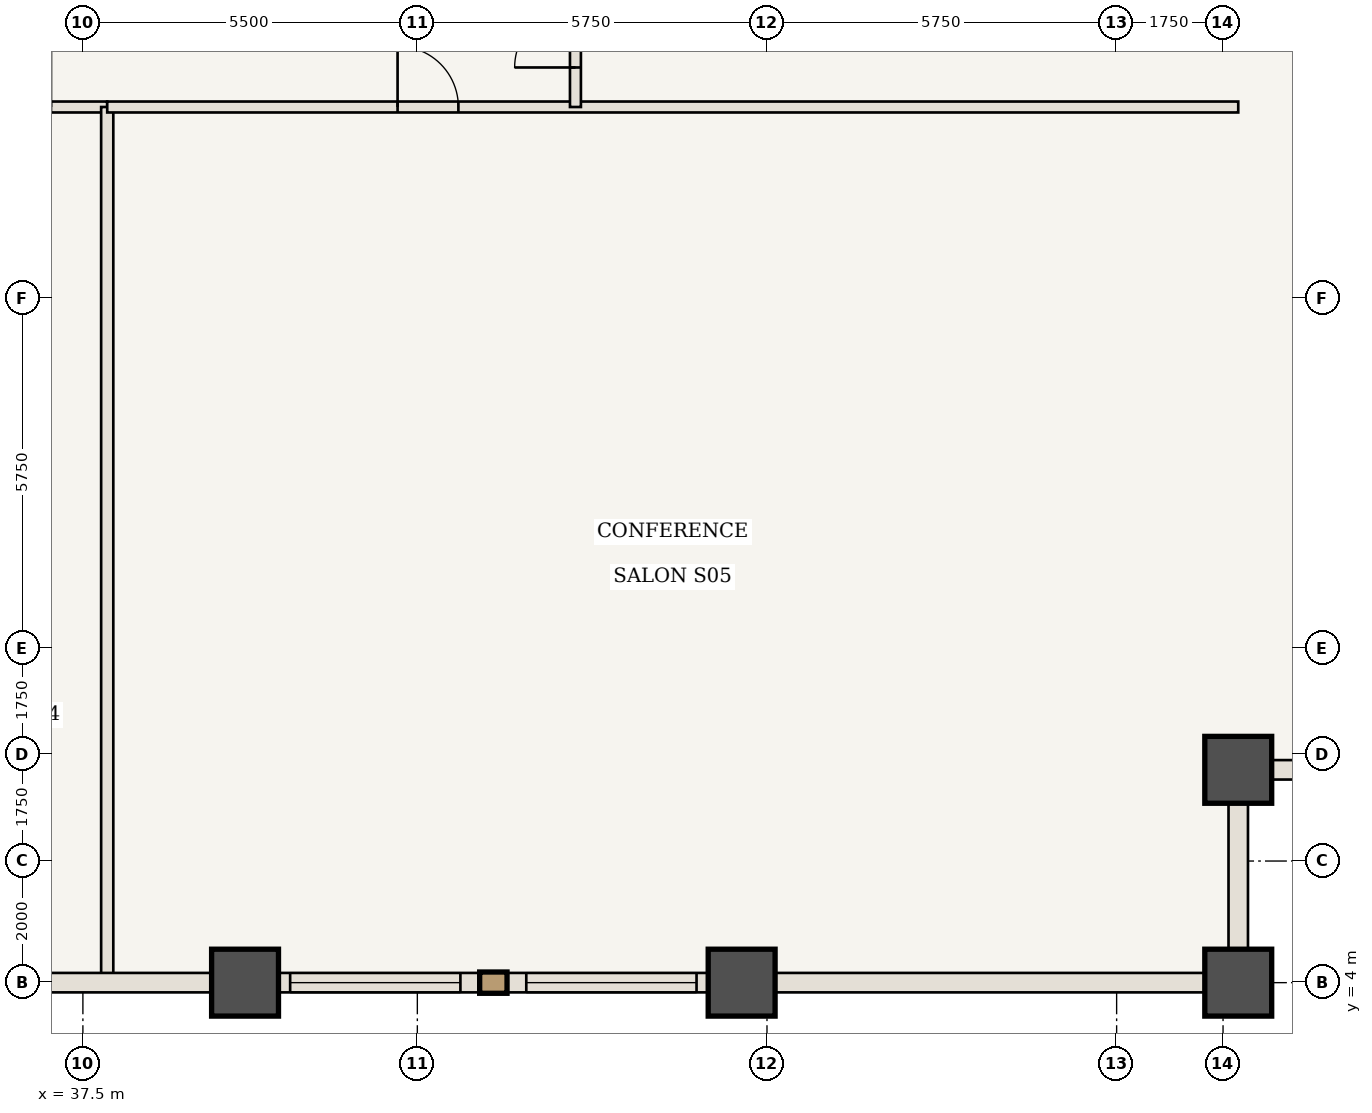
"""IFC4 building model, lengths in metres.
Left out: names, types, materials, properties, quantities, classifications, styles, units other than length and angle.
Written with IfcOpenShell. Run it as: python <this file> out.ifc"""

import sys

from ifc_helpers import new_model, si_unit, direction, frame, frame_2d, origin, origin_2d, place, context, subcontext, project, spatial, rectangle, extrude, element, fill, save


model = new_model("IFC4")
c1 = context("Model", 3, precision=1e-05, world=origin(), true_north=direction((0.0, 1.0)))
c2 = subcontext(c1, "Body", "Model", "MODEL_VIEW")
j1 = project(units=[si_unit("LENGTHUNIT", "METRE"), si_unit("PLANEANGLEUNIT", "RADIAN")], contexts=[c1])
p1 = place(None, origin())
s1 = spatial("IfcSite", under=j1, at=p1, CompositionType="ELEMENT")
p2 = place(p1, origin())
s2 = spatial("IfcBuilding", under=s1, at=p2, CompositionType="ELEMENT")
p3 = place(p2, frame((0.0, 0.0, 38.85)))
s3 = spatial("IfcBuildingStorey", under=s2, at=p3, CompositionType="ELEMENT", Elevation=38.85)
for number, where, z_axis, x_axis in (
    (1, (56.5, 4.0, 0.0), (0.0, 0.0, 1.0), (1.0, 0.0, 0.0)),
    (2, (56.5, 7.5, 0.0), (0.0, 0.0, 1.0), (1.0, 0.0, 0.0)),
    (3, (40.167, 4.0, 0.0), (0.0, 0.0, 1.0), (1.0, 0.0, 0.0)),
    (4, (48.333, 4.0, 0.0), (0.0, 0.0, 1.0), (1.0, 0.0, 0.0)),
):
    element("IfcColumn", number, at=place(p3, frame(where, z_axis=z_axis, x_axis=x_axis)), inside=s3, PredefinedType="COLUMN", context=c2, shape_type="SweptSolid", body=[
        extrude(rectangle(XDim=1.1, YDim=1.1, at=origin_2d()), origin(), (0.0, 0.0, 1.0), 3.5),
    ])
p4 = place(p3, frame((33.2, 18.4, 0.0), z_axis=(0.0, 0.0, 1.0), x_axis=(1.0, 0.0, 0.0)))
e5 = element("IfcWall", 5, at=p4, inside=s3, PredefinedType="STANDARD", context=c2, shape_type="SweptSolid", body=[
    extrude(rectangle(XDim=4.7, YDim=0.18, at=frame_2d((2.35, 0.0))), origin(), (0.0, 0.0, 1.0), 3.08),
])
p5 = place(p4, frame((2.775, 0.0, 0.0)))
e6 = element("IfcOpeningElement", 6, at=p5, cuts=e5, PredefinedType="OPENING", context=c2, shape_type="SweptSolid", body=[
    extrude(rectangle(XDim=1.0, YDim=2.15, at=frame_2d((0.5, 1.075))), frame((0.0, 0.1, 0.0), z_axis=(0.0, -1.0, 0.0), x_axis=(1.0, 0.0, 0.0)), (0.0, 0.0, 1.0), 0.2),
])
p6 = place(p3, frame((37.9, 4.06, 0.0), z_axis=(0.0, 0.0, 1.0), x_axis=(0.0, 1.0, 0.0)))
e7 = element("IfcWall", 7, at=p6, inside=s3, PredefinedType="STANDARD", context=c2, shape_type="SweptSolid", body=[
    extrude(rectangle(XDim=14.34, YDim=0.2, at=frame_2d((7.17, 0.0))), origin(), (0.0, 0.0, 1.0), 3.08),
])
p7 = place(p3, frame((37.9, 18.4, 0.0), z_axis=(0.0, 0.0, 1.0), x_axis=(1.0, 0.0, 0.0)))
e8 = element("IfcWall", 8, at=p7, inside=s3, PredefinedType="STANDARD", context=c2, shape_type="SweptSolid", body=[
    extrude(rectangle(XDim=18.6, YDim=0.18, at=frame_2d((9.3, 0.0))), origin(), (0.0, 0.0, 1.0), 3.08),
])
p8 = place(p7, frame((4.775, 0.0, 0.0)))
e9 = element("IfcOpeningElement", 9, at=p8, cuts=e8, PredefinedType="OPENING", context=c2, shape_type="SweptSolid", body=[
    extrude(rectangle(XDim=1.0, YDim=2.15, at=frame_2d((0.5, 1.075))), frame((0.0, 0.1, 0.0), z_axis=(0.0, -1.0, 0.0), x_axis=(1.0, 0.0, 0.0)), (0.0, 0.0, 1.0), 0.2),
])
p9 = place(p3, frame((45.6, 18.4, 0.0), z_axis=(0.0, 0.0, 1.0), x_axis=(0.0, 1.0, 0.0)))
e10 = element("IfcWall", 10, at=p9, inside=s3, PredefinedType="STANDARD", context=c2, shape_type="SweptSolid", body=[
    extrude(rectangle(XDim=5.2, YDim=0.18, at=frame_2d((2.6, 0.0))), origin(), (0.0, 0.0, 1.0), 3.08),
])
p10 = place(p9, frame((0.65, 0.0, 0.0)))
e11 = element("IfcOpeningElement", 11, at=p10, cuts=e10, PredefinedType="OPENING", context=c2, shape_type="SweptSolid", body=[
    extrude(rectangle(XDim=1.0, YDim=2.15, at=frame_2d((0.5, 1.075))), frame((0.0, 0.1, 0.0), z_axis=(0.0, -1.0, 0.0), x_axis=(1.0, 0.0, 0.0)), (0.0, 0.0, 1.0), 0.2),
])
p11 = place(p3, frame((40.167, 4.0, 0.0), z_axis=(0.0, 0.0, 1.0), x_axis=(-1.0, 0.0, 0.0)))
e12 = element("IfcWall", 12, at=p11, inside=s3, PredefinedType="USERDEFINED", context=c2, shape_type="SweptSolid", body=[
    extrude(rectangle(XDim=8.167, YDim=0.32, at=frame_2d((4.083, 0.0))), origin(), (0.0, 0.0, 1.0), 2.28),
])
p12 = place(p11, frame((3.417, 0.0, 0.85)))
e13 = element("IfcOpeningElement", 13, at=p12, cuts=e12, PredefinedType="OPENING", context=c2, shape_type="SweptSolid", body=[
    extrude(rectangle(XDim=2.4, YDim=1.23, at=frame_2d((1.2, 0.615))), frame((0.0, 0.17, 0.0), z_axis=(0.0, -1.0, 0.0), x_axis=(1.0, 0.0, 0.0)), (0.0, 0.0, 1.0), 0.34),
])
p13 = place(p3, frame((48.333, 4.0, 0.0), z_axis=(0.0, 0.0, 1.0), x_axis=(-1.0, 0.0, 0.0)))
e14 = element("IfcWall", 14, at=p13, inside=s3, PredefinedType="USERDEFINED", context=c2, shape_type="SweptSolid", body=[
    extrude(rectangle(XDim=8.167, YDim=0.32, at=frame_2d((4.083, 0.0))), origin(), (0.0, 0.0, 1.0), 2.28),
])
p14 = place(p13, frame((0.742, 0.0, 0.85)))
e15 = element("IfcOpeningElement", 15, at=p14, cuts=e14, PredefinedType="OPENING", context=c2, shape_type="SweptSolid", body=[
    extrude(rectangle(XDim=2.8, YDim=1.23, at=frame_2d((1.4, 0.615))), frame((0.0, 0.17, 0.0), z_axis=(0.0, -1.0, 0.0), x_axis=(1.0, 0.0, 0.0)), (0.0, 0.0, 1.0), 0.34),
])
p15 = place(p13, frame((4.625, 0.0, 0.85)))
e16 = element("IfcOpeningElement", 16, at=p15, cuts=e14, PredefinedType="OPENING", context=c2, shape_type="SweptSolid", body=[
    extrude(rectangle(XDim=2.8, YDim=1.23, at=frame_2d((1.4, 0.615))), frame((0.0, 0.17, 0.0), z_axis=(0.0, -1.0, 0.0), x_axis=(1.0, 0.0, 0.0)), (0.0, 0.0, 1.0), 0.34),
])
p16 = place(p3, frame((56.5, 4.0, 0.0), z_axis=(0.0, 0.0, 1.0), x_axis=(-1.0, 0.0, 0.0)))
e17 = element("IfcWall", 17, at=p16, inside=s3, PredefinedType="USERDEFINED", context=c2, shape_type="SweptSolid", body=[
    extrude(rectangle(XDim=8.167, YDim=0.32, at=frame_2d((4.083, 0.0))), origin(), (0.0, 0.0, 1.0), 2.28),
])
for number, where, z_axis, x_axis in (
    (18, (56.5, 7.5, 0.0), (0.0, 0.0, 1.0), (0.0, -1.0, 0.0)),
    (19, (60.0, 7.5, 0.0), (0.0, 0.0, 1.0), (-1.0, 0.0, 0.0)),
):
    element("IfcWall", number, at=place(p3, frame(where, z_axis=z_axis, x_axis=x_axis)), inside=s3, PredefinedType="USERDEFINED", context=c2, shape_type="SweptSolid", body=[
        extrude(rectangle(XDim=3.5, YDim=0.32, at=frame_2d((1.75, 0.0))), origin(), (0.0, 0.0, 1.0), 2.28),
    ])
p17 = place(p8, origin())
e20 = element("IfcDoor", 20, at=p17, inside=s3, OperationType="SINGLE_SWING_LEFT", PredefinedType="DOOR", context=c2, shape_type="SweptSolid", body=[
    extrude(rectangle(XDim=1.0, YDim=2.15, at=frame_2d((0.5, 1.075))), frame((0.0, 0.025, 0.0), z_axis=(0.0, -1.0, 0.0), x_axis=(1.0, 0.0, 0.0)), (0.0, 0.0, 1.0), 0.05),
])
fill(e9, e20)
p18 = place(p10, origin())
e21 = element("IfcDoor", 21, at=p18, inside=s3, OperationType="SINGLE_SWING_LEFT", PredefinedType="DOOR", context=c2, shape_type="SweptSolid", body=[
    extrude(rectangle(XDim=1.0, YDim=2.15, at=frame_2d((0.5, 1.075))), frame((0.0, 0.025, 0.0), z_axis=(0.0, -1.0, 0.0), x_axis=(1.0, 0.0, 0.0)), (0.0, 0.0, 1.0), 0.05),
])
fill(e11, e21)
p19 = place(p14, origin())
e22 = element("IfcWindow", 22, at=p19, inside=s3, PartitioningType="SINGLE_PANEL", PredefinedType="WINDOW", context=c2, shape_type="SweptSolid", body=[
    extrude(rectangle(XDim=2.8, YDim=1.23, at=frame_2d((1.4, 0.615))), frame((0.0, 0.03, 0.0), z_axis=(0.0, -1.0, 0.0), x_axis=(1.0, 0.0, 0.0)), (0.0, 0.0, 1.0), 0.06),
])
fill(e15, e22)
p20 = place(p15, origin())
e23 = element("IfcWindow", 23, at=p20, inside=s3, PartitioningType="SINGLE_PANEL", PredefinedType="WINDOW", context=c2, shape_type="SweptSolid", body=[
    extrude(rectangle(XDim=2.8, YDim=1.23, at=frame_2d((1.4, 0.615))), frame((0.0, 0.03, 0.0), z_axis=(0.0, -1.0, 0.0), x_axis=(1.0, 0.0, 0.0)), (0.0, 0.0, 1.0), 0.06),
])
fill(e16, e23)
save(model, sys.argv[1])
